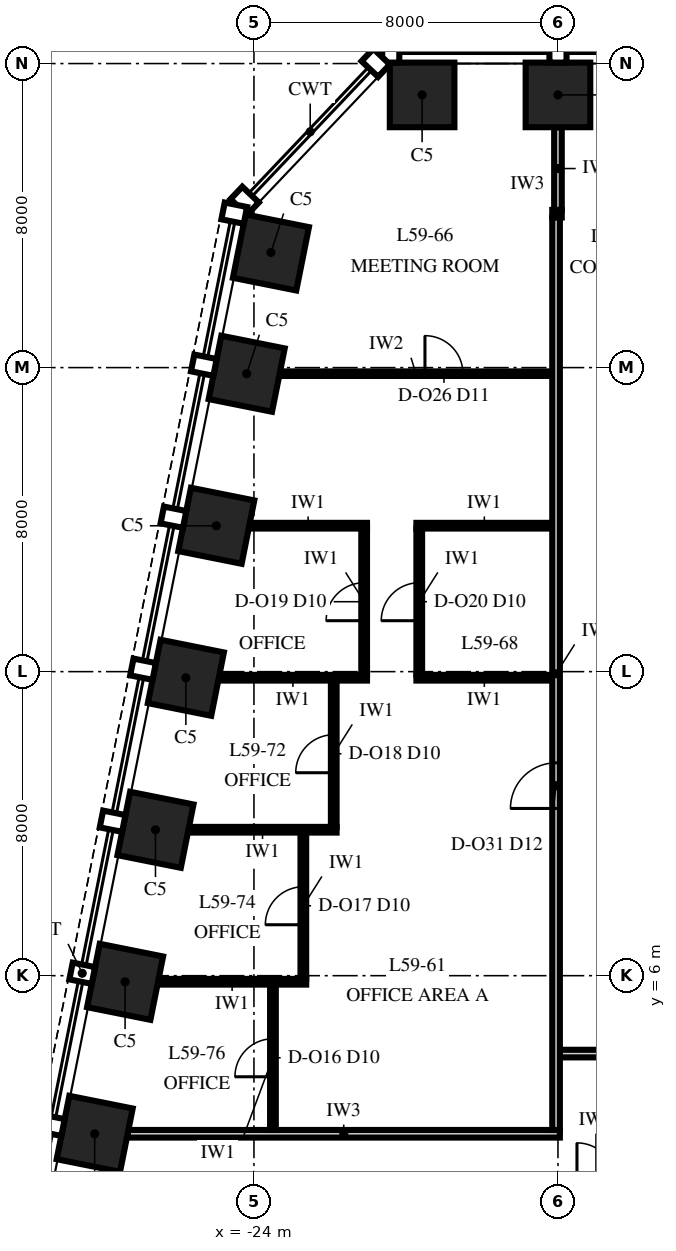
"""IFC4 building model, lengths in metres.
Left out: names, types, materials, properties, quantities, classifications, styles, units other than length and angle.
Written with IfcOpenShell. Run it as: python <this file> out.ifc"""

import sys

from ifc_helpers import new_model, si_unit, direction, frame, frame_2d, origin, origin_2d, place, context, subcontext, project, spatial, rectangle, extrude, element, fill, save


model = new_model("IFC4")
c1 = context("Model", 3, precision=1e-05, world=origin(), true_north=direction((0.0, 1.0)))
c2 = subcontext(c1, "Body", "Model", "MODEL_VIEW")
j1 = project(units=[si_unit("LENGTHUNIT", "METRE"), si_unit("PLANEANGLEUNIT", "RADIAN")], contexts=[c1])
p1 = place(None, origin())
s1 = spatial("IfcSite", under=j1, at=p1, CompositionType="ELEMENT")
p2 = place(p1, origin())
s2 = spatial("IfcBuilding", under=s1, at=p2, CompositionType="ELEMENT")
p3 = place(p2, frame((0.0, 0.0, 256.0)))
s3 = spatial("IfcBuildingStorey", under=s2, at=p3, CompositionType="ELEMENT", Elevation=256.0)
for number, where, z_axis, x_axis in (
    (1, (-16.0, 29.175, 0.0), (0.0, 0.0, 1.0), (-1.0, 0.0, 0.0)),
    (2, (-19.575, 29.175, 0.0), (0.0, 0.0, 1.0), (-1.0, 0.0, 0.0)),
    (3, (-23.553, 25.029, 0.0), (0.0, 0.0, 1.0), (-0.196, -0.981, 0.0)),
    (4, (-24.191, 21.838, 0.0), (0.0, 0.0, 1.0), (-0.196, -0.981, 0.0)),
    (5, (-24.991, 17.838, 0.0), (0.0, 0.0, 1.0), (-0.196, -0.981, 0.0)),
    (6, (-25.791, 13.838, 0.0), (0.0, 0.0, 1.0), (-0.196, -0.981, 0.0)),
    (7, (-26.591, 9.838, 0.0), (0.0, 0.0, 1.0), (-0.196, -0.981, 0.0)),
    (8, (-27.391, 5.838, 0.0), (0.0, 0.0, 1.0), (-0.196, -0.981, 0.0)),
    (9, (-28.191, 1.838, 0.0), (0.0, 0.0, 1.0), (-0.196, -0.981, 0.0)),
):
    element("IfcColumn", number, at=place(p3, frame(where, z_axis=z_axis, x_axis=x_axis)), inside=s3, PredefinedType="COLUMN", context=c2, shape_type="SweptSolid", body=[
        extrude(rectangle(XDim=1.7, YDim=1.7, at=origin_2d()), origin(), (0.0, 0.0, 1.0), 4.0),
    ])
p4 = place(p3, frame((-27.324, 1.84, 0.0), z_axis=(0.0, 0.0, 1.0), x_axis=(1.0, 0.0, 0.0)))
e10 = element("IfcWall", 10, at=p4, inside=s3, PredefinedType="PARTITIONING", context=c2, shape_type="SweptSolid", body=[
    extrude(rectangle(XDim=11.374, YDim=0.2, at=frame_2d((5.687, 0.0))), origin(), (0.0, 0.0, 1.0), 3.23),
])
p5 = place(p3, frame((-15.95, 3.95, 0.0), z_axis=(0.0, 0.0, 1.0), x_axis=(1.0, 0.0, 0.0)))
e11 = element("IfcWall", 11, at=p5, inside=s3, PredefinedType="PARTITIONING", context=c2, shape_type="SweptSolid", body=[
    extrude(rectangle(XDim=31.9, YDim=0.2, at=frame_2d((15.95, 0.0))), origin(), (0.0, 0.0, 1.0), 3.23),
])
p6 = place(p5, frame((3.35, 0.0, 0.0)))
e12 = element("IfcOpeningElement", 12, at=p6, cuts=e11, PredefinedType="OPENING", context=c2, shape_type="SweptSolid", body=[
    extrude(rectangle(XDim=1.2, YDim=2.4, at=frame_2d((0.6, 1.2))), frame((0.0, 0.115, 0.0), z_axis=(0.0, -1.0, 0.0), x_axis=(1.0, 0.0, 0.0)), (0.0, 0.0, 1.0), 0.23),
])
p7 = place(p5, frame((27.35, 0.0, 0.0)))
e13 = element("IfcOpeningElement", 13, at=p7, cuts=e11, PredefinedType="OPENING", context=c2, shape_type="SweptSolid", body=[
    extrude(rectangle(XDim=1.2, YDim=2.4, at=frame_2d((0.6, 1.2))), frame((0.0, 0.115, 0.0), z_axis=(0.0, -1.0, 0.0), x_axis=(1.0, 0.0, 0.0)), (0.0, 0.0, 1.0), 0.23),
])
p8 = place(p5, frame((15.35, 0.0, 0.0)))
e14 = element("IfcOpeningElement", 14, at=p8, cuts=e11, PredefinedType="OPENING", context=c2, shape_type="SweptSolid", body=[
    extrude(rectangle(XDim=1.2, YDim=2.4, at=frame_2d((0.6, 1.2))), frame((0.0, 0.115, 0.0), z_axis=(0.0, -1.0, 0.0), x_axis=(1.0, 0.0, 0.0)), (0.0, 0.0, 1.0), 0.23),
])
p9 = place(p3, frame((-26.524, 5.84, 0.0), z_axis=(0.0, 0.0, 1.0), x_axis=(1.0, 0.0, 0.0)))
e15 = element("IfcWall", 15, at=p9, inside=s3, PredefinedType="PARTITIONING", context=c2, shape_type="SweptSolid", body=[
    extrude(rectangle(XDim=3.899, YDim=0.15, at=frame_2d((1.949, 0.0))), origin(), (0.0, 0.0, 1.0), 2.842),
])
for number, where, z_axis, x_axis in (
    (16, (-25.724, 9.84, 0.0), (0.0, 0.0, 1.0), (1.0, 0.0, 0.0)),
    (17, (-24.924, 13.84, 0.0), (0.0, 0.0, 1.0), (1.0, 0.0, 0.0)),
):
    element("IfcWall", number, at=place(p3, frame(where, z_axis=z_axis, x_axis=x_axis)), inside=s3, PredefinedType="PARTITIONING", context=c2, shape_type="SweptSolid", body=[
        extrude(rectangle(XDim=3.899, YDim=0.15, at=frame_2d((1.949, 0.0))), origin(), (0.0, 0.0, 1.0), 3.23),
    ])
p10 = place(p3, frame((-19.725, 13.84, 0.0), z_axis=(0.0, 0.0, 1.0), x_axis=(1.0, 0.0, 0.0)))
e18 = element("IfcWall", 18, at=p10, inside=s3, PredefinedType="PARTITIONING", context=c2, shape_type="SweptSolid", body=[
    extrude(rectangle(XDim=3.575, YDim=0.15, at=frame_2d((1.788, 0.0))), origin(), (0.0, 0.0, 1.0), 3.85),
])
p11 = place(p3, frame((-24.124, 17.84, 0.0), z_axis=(0.0, 0.0, 1.0), x_axis=(1.0, 0.0, 0.0)))
e19 = element("IfcWall", 19, at=p11, inside=s3, PredefinedType="PARTITIONING", context=c2, shape_type="SweptSolid", body=[
    extrude(rectangle(XDim=3.099, YDim=0.15, at=frame_2d((1.549, 0.0))), origin(), (0.0, 0.0, 1.0), 3.23),
])
p12 = place(p3, frame((-19.725, 17.84, 0.0), z_axis=(0.0, 0.0, 1.0), x_axis=(1.0, 0.0, 0.0)))
e20 = element("IfcWall", 20, at=p12, inside=s3, PredefinedType="PARTITIONING", context=c2, shape_type="SweptSolid", body=[
    extrude(rectangle(XDim=3.575, YDim=0.15, at=frame_2d((1.788, 0.0))), origin(), (0.0, 0.0, 1.0), 3.23),
])
p13 = place(p3, frame((-23.324, 21.84, 0.0), z_axis=(0.0, 0.0, 1.0), x_axis=(1.0, 0.0, 0.0)))
e21 = element("IfcWall", 21, at=p13, inside=s3, PredefinedType="PARTITIONING", context=c2, shape_type="SweptSolid", body=[
    extrude(rectangle(XDim=7.174, YDim=0.12, at=frame_2d((3.587, 0.0))), origin(), (0.0, 0.0, 1.0), 3.23),
])
p14 = place(p13, frame((3.824, 0.0, 0.0)))
e22 = element("IfcOpeningElement", 22, at=p14, cuts=e21, PredefinedType="OPENING", context=c2, shape_type="SweptSolid", body=[
    extrude(rectangle(XDim=1.0, YDim=2.4, at=frame_2d((0.5, 1.2))), frame((0.0, 0.075, 0.0), z_axis=(0.0, -1.0, 0.0), x_axis=(1.0, 0.0, 0.0)), (0.0, 0.0, 1.0), 0.15),
])
p15 = place(p3, frame((-16.15, 26.05, 0.0), z_axis=(0.0, 0.0, 1.0), x_axis=(1.0, 0.0, 0.0)))
e23 = element("IfcWall", 23, at=p15, inside=s3, PredefinedType="PARTITIONING", context=c2, shape_type="SweptSolid", body=[
    extrude(rectangle(XDim=0.25, YDim=0.2, at=frame_2d((0.125, 0.0))), origin(), (0.0, 0.0, 1.0), 3.418),
])
p16 = place(p3, frame((-23.5, 1.94, 0.0), z_axis=(0.0, 0.0, 1.0), x_axis=(0.0, 1.0, 0.0)))
e24 = element("IfcWall", 24, at=p16, inside=s3, PredefinedType="PARTITIONING", context=c2, shape_type="SweptSolid", body=[
    extrude(rectangle(XDim=3.825, YDim=0.15, at=frame_2d((1.913, 0.0))), origin(), (0.0, 0.0, 1.0), 3.85),
])
p17 = place(p16, frame((1.4, 0.0, 0.0)))
e25 = element("IfcOpeningElement", 25, at=p17, cuts=e24, PredefinedType="OPENING", context=c2, shape_type="SweptSolid", body=[
    extrude(rectangle(XDim=1.0, YDim=2.3, at=frame_2d((0.5, 1.15))), frame((0.0, 0.09, 0.0), z_axis=(0.0, -1.0, 0.0), x_axis=(1.0, 0.0, 0.0)), (0.0, 0.0, 1.0), 0.18),
])
p18 = place(p3, frame((-22.7, 5.915, 0.0), z_axis=(0.0, 0.0, 1.0), x_axis=(0.0, 1.0, 0.0)))
e26 = element("IfcWall", 26, at=p18, inside=s3, PredefinedType="PARTITIONING", context=c2, shape_type="SweptSolid", body=[
    extrude(rectangle(XDim=3.85, YDim=0.15, at=frame_2d((1.925, 0.0))), origin(), (0.0, 0.0, 1.0), 2.842),
])
p19 = place(p18, frame((1.425, 0.0, 0.0)))
e27 = element("IfcOpeningElement", 27, at=p19, cuts=e26, PredefinedType="OPENING", context=c2, shape_type="SweptSolid", body=[
    extrude(rectangle(XDim=1.0, YDim=2.3, at=frame_2d((0.5, 1.15))), frame((0.0, 0.09, 0.0), z_axis=(0.0, -1.0, 0.0), x_axis=(1.0, 0.0, 0.0)), (0.0, 0.0, 1.0), 0.18),
])
p20 = place(p3, frame((-21.9, 9.915, 0.0), z_axis=(0.0, 0.0, 1.0), x_axis=(0.0, 1.0, 0.0)))
e28 = element("IfcWall", 28, at=p20, inside=s3, PredefinedType="PARTITIONING", context=c2, shape_type="SweptSolid", body=[
    extrude(rectangle(XDim=3.85, YDim=0.15, at=frame_2d((1.925, 0.0))), origin(), (0.0, 0.0, 1.0), 3.85),
])
p21 = place(p20, frame((1.425, 0.0, 0.0)))
e29 = element("IfcOpeningElement", 29, at=p21, cuts=e28, PredefinedType="OPENING", context=c2, shape_type="SweptSolid", body=[
    extrude(rectangle(XDim=1.0, YDim=2.3, at=frame_2d((0.5, 1.15))), frame((0.0, 0.09, 0.0), z_axis=(0.0, -1.0, 0.0), x_axis=(1.0, 0.0, 0.0)), (0.0, 0.0, 1.0), 0.18),
])
p22 = place(p3, frame((-21.1, 13.915, 0.0), z_axis=(0.0, 0.0, 1.0), x_axis=(0.0, 1.0, 0.0)))
e30 = element("IfcWall", 30, at=p22, inside=s3, PredefinedType="PARTITIONING", context=c2, shape_type="SweptSolid", body=[
    extrude(rectangle(XDim=3.85, YDim=0.15, at=frame_2d((1.925, 0.0))), origin(), (0.0, 0.0, 1.0), 3.23),
])
p23 = place(p22, frame((1.425, 0.0, 0.0)))
e31 = element("IfcOpeningElement", 31, at=p23, cuts=e30, PredefinedType="OPENING", context=c2, shape_type="SweptSolid", body=[
    extrude(rectangle(XDim=1.0, YDim=2.3, at=frame_2d((0.5, 1.15))), frame((0.0, 0.09, 0.0), z_axis=(0.0, -1.0, 0.0), x_axis=(1.0, 0.0, 0.0)), (0.0, 0.0, 1.0), 0.18),
])
p24 = place(p3, frame((-19.65, 13.915, 0.0), z_axis=(0.0, 0.0, 1.0), x_axis=(0.0, 1.0, 0.0)))
e32 = element("IfcWall", 32, at=p24, inside=s3, PredefinedType="PARTITIONING", context=c2, shape_type="SweptSolid", body=[
    extrude(rectangle(XDim=3.85, YDim=0.15, at=frame_2d((1.925, 0.0))), origin(), (0.0, 0.0, 1.0), 3.23),
])
p25 = place(p24, frame((1.425, 0.0, 0.0)))
e33 = element("IfcOpeningElement", 33, at=p25, cuts=e32, PredefinedType="OPENING", context=c2, shape_type="SweptSolid", body=[
    extrude(rectangle(XDim=1.0, YDim=2.3, at=frame_2d((0.5, 1.15))), frame((0.0, 0.09, 0.0), z_axis=(0.0, -1.0, 0.0), x_axis=(1.0, 0.0, 0.0)), (0.0, 0.0, 1.0), 0.18),
])
p26 = place(p3, frame((-16.05, 1.94, 0.0), z_axis=(0.0, 0.0, 1.0), x_axis=(0.0, 1.0, 0.0)))
e34 = element("IfcWall", 34, at=p26, inside=s3, PredefinedType="PARTITIONING", context=c2, shape_type="SweptSolid", body=[
    extrude(rectangle(XDim=24.01, YDim=0.2, at=frame_2d((12.005, 0.0))), origin(), (0.0, 0.0, 1.0), 2.842),
])
p27 = place(p26, frame((8.46, 0.0, 0.0)))
e35 = element("IfcOpeningElement", 35, at=p27, cuts=e34, PredefinedType="OPENING", context=c2, shape_type="SweptSolid", body=[
    extrude(rectangle(XDim=1.2, YDim=2.4, at=frame_2d((0.6, 1.2))), frame((0.0, 0.115, 0.0), z_axis=(0.0, -1.0, 0.0), x_axis=(1.0, 0.0, 0.0)), (0.0, 0.0, 1.0), 0.23),
])
p28 = place(p3, frame((-16.0, 26.15, 0.0), z_axis=(0.0, 0.0, 1.0), x_axis=(0.0, 1.0, 0.0)))
e36 = element("IfcWall", 36, at=p28, inside=s3, PredefinedType="PARTITIONING", context=c2, shape_type="SweptSolid", body=[
    extrude(rectangle(XDim=2.175, YDim=0.2, at=frame_2d((1.087, 0.0))), origin(), (0.0, 0.0, 1.0), 3.418),
])
p29 = place(p17, origin())
e37 = element("IfcDoor", 37, at=p29, inside=s3, OperationType="SINGLE_SWING_LEFT", PredefinedType="DOOR", context=c2, shape_type="SweptSolid", body=[
    extrude(rectangle(XDim=1.0, YDim=2.3, at=frame_2d((0.5, 1.15))), frame((0.0, 0.075, 0.0), z_axis=(0.0, -1.0, 0.0), x_axis=(1.0, 0.0, 0.0)), (0.0, 0.0, 1.0), 0.149),
])
fill(e25, e37)
p30 = place(p19, origin())
e38 = element("IfcDoor", 38, at=p30, inside=s3, OperationType="SINGLE_SWING_LEFT", PredefinedType="DOOR", context=c2, shape_type="SweptSolid", body=[
    extrude(rectangle(XDim=1.0, YDim=2.3, at=frame_2d((0.5, 1.15))), frame((0.0, 0.075, 0.0), z_axis=(0.0, -1.0, 0.0), x_axis=(1.0, 0.0, 0.0)), (0.0, 0.0, 1.0), 0.149),
])
fill(e27, e38)
p31 = place(p21, origin())
e39 = element("IfcDoor", 39, at=p31, inside=s3, OperationType="SINGLE_SWING_LEFT", PredefinedType="DOOR", context=c2, shape_type="SweptSolid", body=[
    extrude(rectangle(XDim=1.0, YDim=2.3, at=frame_2d((0.5, 1.15))), frame((0.0, 0.075, 0.0), z_axis=(0.0, -1.0, 0.0), x_axis=(1.0, 0.0, 0.0)), (0.0, 0.0, 1.0), 0.149),
])
fill(e29, e39)
p32 = place(p23, origin())
e40 = element("IfcDoor", 40, at=p32, inside=s3, OperationType="SINGLE_SWING_LEFT", PredefinedType="DOOR", context=c2, shape_type="SweptSolid", body=[
    extrude(rectangle(XDim=1.0, YDim=2.3, at=frame_2d((0.5, 1.15))), frame((0.0, 0.075, 0.0), z_axis=(0.0, -1.0, 0.0), x_axis=(1.0, 0.0, 0.0)), (0.0, 0.0, 1.0), 0.149),
])
fill(e31, e40)
p33 = place(p25, origin())
e41 = element("IfcDoor", 41, at=p33, inside=s3, OperationType="SINGLE_SWING_LEFT", PredefinedType="DOOR", context=c2, shape_type="SweptSolid", body=[
    extrude(rectangle(XDim=1.0, YDim=2.3, at=frame_2d((0.5, 1.15))), frame((0.0, 0.075, 0.0), z_axis=(0.0, -1.0, 0.0), x_axis=(1.0, 0.0, 0.0)), (0.0, 0.0, 1.0), 0.149),
])
fill(e33, e41)
p34 = place(p14, origin())
e42 = element("IfcDoor", 42, at=p34, inside=s3, OperationType="SINGLE_SWING_RIGHT", PredefinedType="DOOR", context=c2, shape_type="SweptSolid", body=[
    extrude(rectangle(XDim=1.0, YDim=2.4, at=frame_2d((0.5, 1.2))), frame((0.0, 0.06, 0.0), z_axis=(0.0, -1.0, 0.0), x_axis=(1.0, 0.0, 0.0)), (0.0, 0.0, 1.0), 0.12),
])
fill(e22, e42)
p35 = place(p27, origin())
e43 = element("IfcDoor", 43, at=p35, inside=s3, OperationType="SINGLE_SWING_LEFT", PredefinedType="DOOR", context=c2, shape_type="SweptSolid", body=[
    extrude(rectangle(XDim=1.2, YDim=2.4, at=frame_2d((0.6, 1.2))), frame((0.0, 0.1, 0.0), z_axis=(0.0, -1.0, 0.0), x_axis=(1.0, 0.0, 0.0)), (0.0, 0.0, 1.0), 0.199),
])
fill(e35, e43)
save(model, sys.argv[1])
